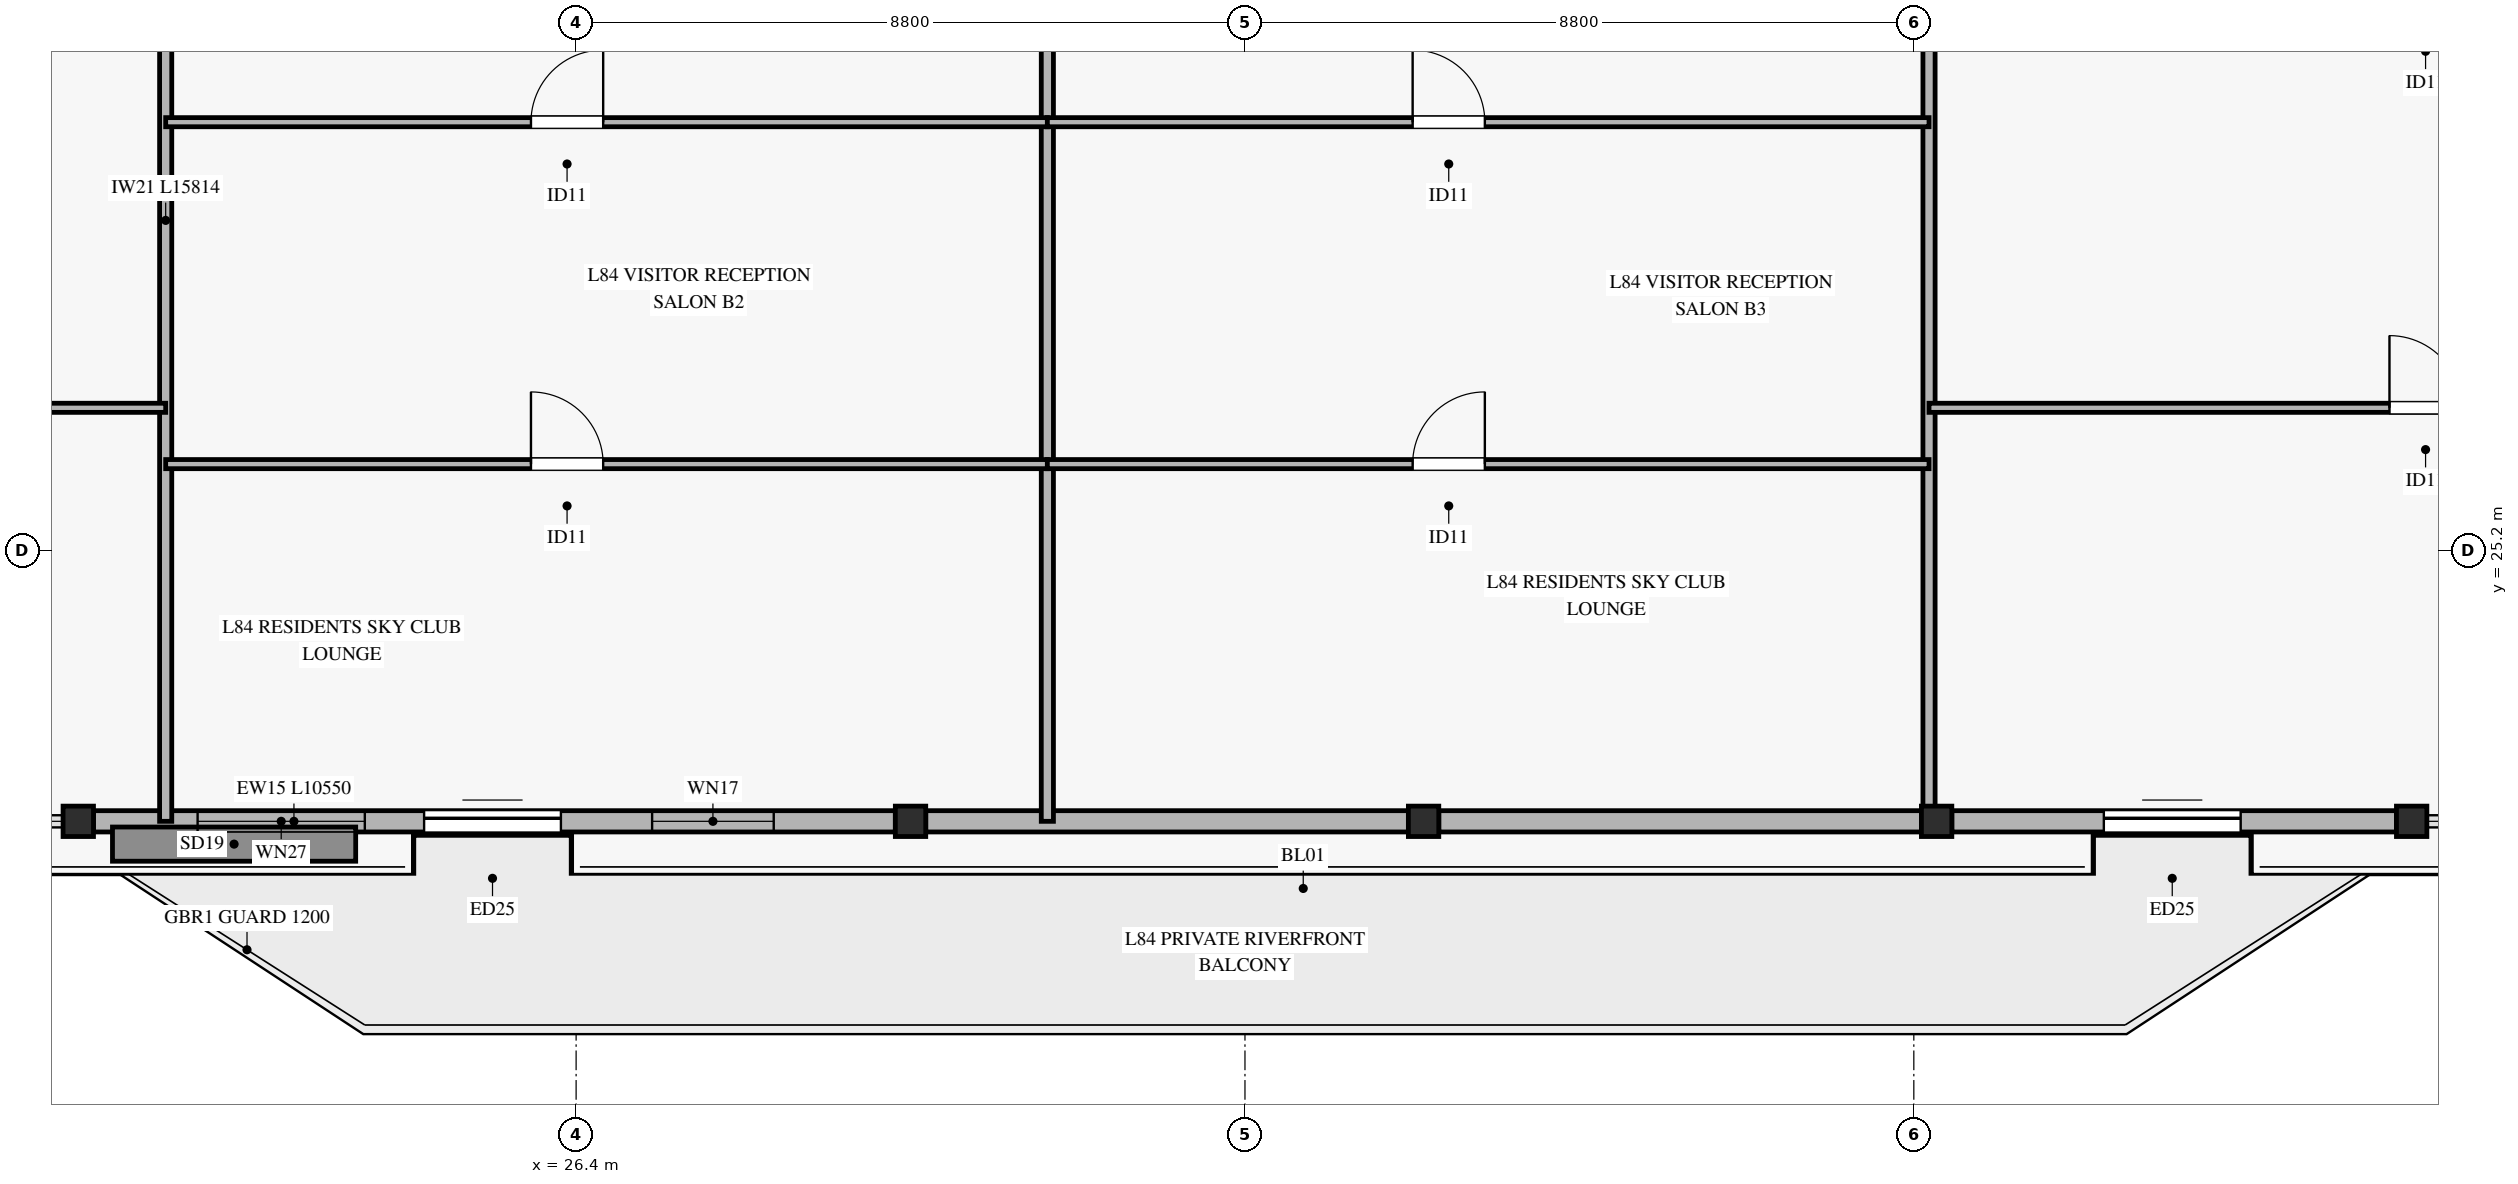
"""IFC4 building model, lengths in metres.
Left out: names, types, materials, properties, quantities, classifications, styles, units other than length and angle.
Written with IfcOpenShell. Run it as: python <this file> out.ifc"""

import sys

from ifc_helpers import new_model, si_unit, direction, frame, frame_2d, origin, origin_2d, place, context, subcontext, project, spatial, rectangle, hollow_rectangle, extrude, source, transform, mapped, element, fill, save


model = new_model("IFC4")
c1 = context("Model", 3, precision=1e-05, world=origin(), true_north=direction((0.0, 1.0)))
c2 = subcontext(c1, "Body", "Model", "MODEL_VIEW")
j1 = project(units=[si_unit("LENGTHUNIT", "METRE"), si_unit("PLANEANGLEUNIT", "RADIAN")], contexts=[c1])
p1 = place(None, origin())
s1 = spatial("IfcSite", under=j1, at=p1, CompositionType="ELEMENT")
p2 = place(p1, origin())
s2 = spatial("IfcBuilding", under=s1, at=p2, CompositionType="ELEMENT")
p3 = place(p2, frame((0.0, 0.0, 324.4)))
s3 = spatial("IfcBuildingStorey", under=s2, at=p3, CompositionType="ELEMENT", Elevation=324.4)
m1 = source(origin(), c2, "Body", "SweptSolid", [
    extrude(hollow_rectangle(XDim=0.4, YDim=0.4, WallThickness=0.02, at=origin_2d()), origin(), (0.0, 0.0, 1.0), 3.12),
])
for number, where, z_axis, x_axis in (
    (1, (19.85, 21.636, 0.0), (0.0, 0.0, 1.0), (1.0, 0.0, 0.0)),
    (2, (30.8, 21.636, 0.0), (0.0, 0.0, 1.0), (1.0, 0.0, 0.0)),
    (3, (37.55, 21.636, 0.0), (0.0, 0.0, 1.0), (1.0, 0.0, 0.0)),
    (4, (44.3, 21.636, 0.0), (0.0, 0.0, 1.0), (1.0, 0.0, 0.0)),
    (5, (50.55, 21.636, 0.0), (0.0, 0.0, 1.0), (1.0, 0.0, 0.0)),
):
    element("IfcColumn", number, at=place(p3, frame(where, z_axis=z_axis, x_axis=x_axis)), inside=s3, PredefinedType="COLUMN", context=c2, shape_type="MappedRepresentation", body=[
        mapped(m1, transform((0.0, 0.0, 0.0), x_axis=(1.0, 0.0, 0.0), y_axis=(0.0, 1.0, 0.0), z_axis=(0.0, 0.0, 1.0), scale=1.0)),
    ])
p4 = place(p3, frame((20.05, 21.636, 0.0), z_axis=(0.0, 0.0, 1.0), x_axis=(1.0, 0.0, 0.0)))
e6 = element("IfcWall", 6, at=p4, inside=s3, PredefinedType="SOLIDWALL", context=c2, shape_type="SweptSolid", body=[
    extrude(rectangle(XDim=10.55, YDim=0.28, at=frame_2d((5.275, 0.0))), origin(), (0.0, 0.0, 1.0), 2.75),
])
p5 = place(p4, frame((4.35, 0.0, 0.0)))
e7 = element("IfcOpeningElement", 7, at=p5, cuts=e6, PredefinedType="OPENING", context=c2, shape_type="SweptSolid", body=[
    extrude(rectangle(XDim=1.8, YDim=2.25, at=frame_2d((0.9, 1.125))), frame((0.0, 0.15, 0.0), z_axis=(0.0, -1.0, 0.0), x_axis=(1.0, 0.0, 0.0)), (0.0, 0.0, 1.0), 0.3),
])
p6 = place(p4, frame((1.37, 0.0, 0.45)))
e8 = element("IfcOpeningElement", 8, at=p6, cuts=e6, PredefinedType="OPENING", context=c2, shape_type="SweptSolid", body=[
    extrude(rectangle(XDim=2.2, YDim=2.1, at=frame_2d((1.1, 1.05))), frame((0.0, 0.15, 0.0), z_axis=(0.0, -1.0, 0.0), x_axis=(1.0, 0.0, 0.0)), (0.0, 0.0, 1.0), 0.3),
])
p7 = place(p4, frame((7.35, 0.0, 0.45)))
e9 = element("IfcOpeningElement", 9, at=p7, cuts=e6, PredefinedType="OPENING", context=c2, shape_type="SweptSolid", body=[
    extrude(rectangle(XDim=1.6, YDim=2.0, at=frame_2d((0.8, 1.0))), frame((0.0, 0.15, 0.0), z_axis=(0.0, -1.0, 0.0), x_axis=(1.0, 0.0, 0.0)), (0.0, 0.0, 1.0), 0.3),
])
for number, where, z_axis, x_axis in (
    (10, (31.0, 21.636, 0.0), (0.0, 0.0, 1.0), (1.0, 0.0, 0.0)),
    (11, (37.75, 21.636, 0.0), (0.0, 0.0, 1.0), (1.0, 0.0, 0.0)),
):
    element("IfcWall", number, at=place(p3, frame(where, z_axis=z_axis, x_axis=x_axis)), inside=s3, PredefinedType="SOLIDWALL", context=c2, shape_type="SweptSolid", body=[
        extrude(rectangle(XDim=6.35, YDim=0.28, at=frame_2d((3.175, 0.0))), origin(), (0.0, 0.0, 1.0), 2.75),
    ])
p8 = place(p3, frame((44.5, 21.636, 0.0), z_axis=(0.0, 0.0, 1.0), x_axis=(1.0, 0.0, 0.0)))
e12 = element("IfcWall", 12, at=p8, inside=s3, PredefinedType="SOLIDWALL", context=c2, shape_type="SweptSolid", body=[
    extrude(rectangle(XDim=5.85, YDim=0.28, at=frame_2d((2.925, 0.0))), origin(), (0.0, 0.0, 1.0), 2.75),
])
p9 = place(p8, frame((2.0, 0.0, 0.0)))
e13 = element("IfcOpeningElement", 13, at=p9, cuts=e12, PredefinedType="OPENING", context=c2, shape_type="SweptSolid", body=[
    extrude(rectangle(XDim=1.8, YDim=2.25, at=frame_2d((0.9, 1.125))), frame((0.0, 0.15, 0.0), z_axis=(0.0, -1.0, 0.0), x_axis=(1.0, 0.0, 0.0)), (0.0, 0.0, 1.0), 0.3),
])
p10 = place(p3, frame((21.0, 21.636, 0.0), z_axis=(0.0, 0.0, 1.0), x_axis=(0.0, 1.0, 0.0)))
e14 = element("IfcWall", 14, at=p10, inside=s3, PredefinedType="PARTITIONING", context=c2, shape_type="SweptSolid", body=[
    extrude(rectangle(XDim=15.814, YDim=0.16, at=frame_2d((7.907, 0.0))), origin(), (0.0, 0.0, 1.0), 2.705),
])
p11 = place(p10, frame((13.934, 0.0, 0.0)))
e15 = element("IfcOpeningElement", 15, at=p11, cuts=e14, PredefinedType="OPENING", context=c2, shape_type="SweptSolid", body=[
    extrude(rectangle(XDim=1.05, YDim=2.15, at=frame_2d((0.525, 1.075))), frame((0.0, 0.09, 0.0), z_axis=(0.0, -1.0, 0.0), x_axis=(1.0, 0.0, 0.0)), (0.0, 0.0, 1.0), 0.18),
])
p12 = place(p3, frame((32.6, 21.636, 0.0), z_axis=(0.0, 0.0, 1.0), x_axis=(0.0, 1.0, 0.0)))
e16 = element("IfcWall", 16, at=p12, inside=s3, PredefinedType="PARTITIONING", context=c2, shape_type="SweptSolid", body=[
    extrude(rectangle(XDim=13.514, YDim=0.16, at=frame_2d((6.757, 0.0))), origin(), (0.0, 0.0, 1.0), 2.705),
])
p13 = place(p3, frame((44.2, 21.636, 0.0), z_axis=(0.0, 0.0, 1.0), x_axis=(0.0, 1.0, 0.0)))
e17 = element("IfcWall", 17, at=p13, inside=s3, PredefinedType="PARTITIONING", context=c2, shape_type="SweptSolid", body=[
    extrude(rectangle(XDim=15.814, YDim=0.16, at=frame_2d((7.907, 0.0))), origin(), (0.0, 0.0, 1.0), 2.405),
])
p14 = place(p13, frame((13.934, 0.0, 0.0)))
e18 = element("IfcOpeningElement", 18, at=p14, cuts=e17, PredefinedType="OPENING", context=c2, shape_type="SweptSolid", body=[
    extrude(rectangle(XDim=1.05, YDim=2.15, at=frame_2d((0.525, 1.075))), frame((0.0, 0.09, 0.0), z_axis=(0.0, -1.0, 0.0), x_axis=(1.0, 0.0, 0.0)), (0.0, 0.0, 1.0), 0.18),
])
p15 = place(p3, frame((11.27, 27.077, 0.0), z_axis=(0.0, 0.0, 1.0), x_axis=(1.0, 0.0, 0.0)))
e19 = element("IfcWall", 19, at=p15, inside=s3, PredefinedType="PARTITIONING", context=c2, shape_type="SweptSolid", body=[
    extrude(rectangle(XDim=9.73, YDim=0.12, at=frame_2d((4.865, 0.0))), origin(), (0.0, 0.0, 1.0), 2.405),
])
p16 = place(p15, frame((4.178, 0.0, 0.0)))
e20 = element("IfcOpeningElement", 20, at=p16, cuts=e19, PredefinedType="OPENING", context=c2, shape_type="SweptSolid", body=[
    extrude(rectangle(XDim=0.95, YDim=2.1, at=frame_2d((0.475, 1.05))), frame((0.0, 0.07, 0.0), z_axis=(0.0, -1.0, 0.0), x_axis=(1.0, 0.0, 0.0)), (0.0, 0.0, 1.0), 0.14),
])
p17 = place(p3, frame((21.0, 26.336, 0.0), z_axis=(0.0, 0.0, 1.0), x_axis=(1.0, 0.0, 0.0)))
e21 = element("IfcWall", 21, at=p17, inside=s3, PredefinedType="PARTITIONING", context=c2, shape_type="SweptSolid", body=[
    extrude(rectangle(XDim=11.6, YDim=0.12, at=frame_2d((5.8, 0.0))), origin(), (0.0, 0.0, 1.0), 2.405),
])
p18 = place(p17, frame((4.806, 0.0, 0.0)))
e22 = element("IfcOpeningElement", 22, at=p18, cuts=e21, PredefinedType="OPENING", context=c2, shape_type="SweptSolid", body=[
    extrude(rectangle(XDim=0.95, YDim=2.1, at=frame_2d((0.475, 1.05))), frame((0.0, 0.07, 0.0), z_axis=(0.0, -1.0, 0.0), x_axis=(1.0, 0.0, 0.0)), (0.0, 0.0, 1.0), 0.14),
])
p19 = place(p3, frame((21.0, 30.835, 0.0), z_axis=(0.0, 0.0, 1.0), x_axis=(1.0, 0.0, 0.0)))
e23 = element("IfcWall", 23, at=p19, inside=s3, PredefinedType="PARTITIONING", context=c2, shape_type="SweptSolid", body=[
    extrude(rectangle(XDim=11.6, YDim=0.12, at=frame_2d((5.8, 0.0))), origin(), (0.0, 0.0, 1.0), 2.405),
])
p20 = place(p19, frame((4.806, 0.0, 0.0)))
e24 = element("IfcOpeningElement", 24, at=p20, cuts=e23, PredefinedType="OPENING", context=c2, shape_type="SweptSolid", body=[
    extrude(rectangle(XDim=0.95, YDim=2.1, at=frame_2d((0.475, 1.05))), frame((0.0, 0.07, 0.0), z_axis=(0.0, -1.0, 0.0), x_axis=(1.0, 0.0, 0.0)), (0.0, 0.0, 1.0), 0.14),
])
p21 = place(p3, frame((32.6, 26.336, 0.0), z_axis=(0.0, 0.0, 1.0), x_axis=(1.0, 0.0, 0.0)))
e25 = element("IfcWall", 25, at=p21, inside=s3, PredefinedType="PARTITIONING", context=c2, shape_type="SweptSolid", body=[
    extrude(rectangle(XDim=11.6, YDim=0.12, at=frame_2d((5.8, 0.0))), origin(), (0.0, 0.0, 1.0), 2.405),
])
p22 = place(p21, frame((4.806, 0.0, 0.0)))
e26 = element("IfcOpeningElement", 26, at=p22, cuts=e25, PredefinedType="OPENING", context=c2, shape_type="SweptSolid", body=[
    extrude(rectangle(XDim=0.95, YDim=2.1, at=frame_2d((0.475, 1.05))), frame((0.0, 0.07, 0.0), z_axis=(0.0, -1.0, 0.0), x_axis=(1.0, 0.0, 0.0)), (0.0, 0.0, 1.0), 0.14),
])
p23 = place(p3, frame((32.6, 30.835, 0.0), z_axis=(0.0, 0.0, 1.0), x_axis=(1.0, 0.0, 0.0)))
e27 = element("IfcWall", 27, at=p23, inside=s3, PredefinedType="PARTITIONING", context=c2, shape_type="SweptSolid", body=[
    extrude(rectangle(XDim=11.6, YDim=0.12, at=frame_2d((5.8, 0.0))), origin(), (0.0, 0.0, 1.0), 2.405),
])
p24 = place(p23, frame((4.806, 0.0, 0.0)))
e28 = element("IfcOpeningElement", 28, at=p24, cuts=e27, PredefinedType="OPENING", context=c2, shape_type="SweptSolid", body=[
    extrude(rectangle(XDim=0.95, YDim=2.1, at=frame_2d((0.475, 1.05))), frame((0.0, 0.07, 0.0), z_axis=(0.0, -1.0, 0.0), x_axis=(1.0, 0.0, 0.0)), (0.0, 0.0, 1.0), 0.14),
])
p25 = place(p3, frame((44.2, 27.077, 0.0), z_axis=(0.0, 0.0, 1.0), x_axis=(1.0, 0.0, 0.0)))
e29 = element("IfcWall", 29, at=p25, inside=s3, PredefinedType="PARTITIONING", context=c2, shape_type="SweptSolid", body=[
    extrude(rectangle(XDim=14.931, YDim=0.12, at=frame_2d((7.466, 0.0))), origin(), (0.0, 0.0, 1.0), 2.405),
])
p26 = place(p25, frame((6.058, 0.0, 0.0)))
e30 = element("IfcOpeningElement", 30, at=p26, cuts=e29, PredefinedType="OPENING", context=c2, shape_type="SweptSolid", body=[
    extrude(rectangle(XDim=0.95, YDim=2.1, at=frame_2d((0.475, 1.05))), frame((0.0, 0.07, 0.0), z_axis=(0.0, -1.0, 0.0), x_axis=(1.0, 0.0, 0.0)), (0.0, 0.0, 1.0), 0.14),
])
m2 = source(origin(), c2, "Body", "SweptSolid", [
    extrude(rectangle(XDim=1.8, YDim=2.25, at=frame_2d((0.9, 1.125))), frame((0.0, 0.025, 0.0), z_axis=(0.0, -1.0, 0.0), x_axis=(1.0, 0.0, 0.0)), (0.0, 0.0, 1.0), 0.05),
])
p27 = place(p5, origin())
e31 = element("IfcDoor", 31, at=p27, inside=s3, OperationType="SLIDING_TO_LEFT", PredefinedType="DOOR", context=c2, shape_type="MappedRepresentation", body=[
    mapped(m2, transform((0.0, 0.0, 0.0), x_axis=(1.0, 0.0, 0.0), y_axis=(0.0, 1.0, 0.0), z_axis=(0.0, 0.0, 1.0), scale=1.0)),
])
fill(e7, e31)
m3 = source(origin(), c2, "Body", "SweptSolid", [
    extrude(rectangle(XDim=2.2, YDim=2.1, at=frame_2d((1.1, 1.05))), frame((0.0, 0.03, 0.0), z_axis=(0.0, -1.0, 0.0), x_axis=(1.0, 0.0, 0.0)), (0.0, 0.0, 1.0), 0.06),
])
p28 = place(p6, origin())
e32 = element("IfcWindow", 32, at=p28, inside=s3, PartitioningType="SINGLE_PANEL", PredefinedType="WINDOW", context=c2, shape_type="MappedRepresentation", body=[
    mapped(m3, transform((0.0, 0.0, 0.0), x_axis=(1.0, 0.0, 0.0), y_axis=(0.0, 1.0, 0.0), z_axis=(0.0, 0.0, 1.0), scale=1.0)),
])
fill(e8, e32)
m4 = source(origin(), c2, "Body", "SweptSolid", [
    extrude(rectangle(XDim=1.6, YDim=2.0, at=frame_2d((0.8, 1.0))), frame((0.0, 0.03, 0.0), z_axis=(0.0, -1.0, 0.0), x_axis=(1.0, 0.0, 0.0)), (0.0, 0.0, 1.0), 0.06),
])
p29 = place(p7, origin())
e33 = element("IfcWindow", 33, at=p29, inside=s3, PartitioningType="SINGLE_PANEL", PredefinedType="WINDOW", context=c2, shape_type="MappedRepresentation", body=[
    mapped(m4, transform((0.0, 0.0, 0.0), x_axis=(1.0, 0.0, 0.0), y_axis=(0.0, 1.0, 0.0), z_axis=(0.0, 0.0, 1.0), scale=1.0)),
])
fill(e9, e33)
p30 = place(p9, origin())
e34 = element("IfcDoor", 34, at=p30, inside=s3, OperationType="SLIDING_TO_LEFT", PredefinedType="DOOR", context=c2, shape_type="MappedRepresentation", body=[
    mapped(m2, transform((0.0, 0.0, 0.0), x_axis=(1.0, 0.0, 0.0), y_axis=(0.0, 1.0, 0.0), z_axis=(0.0, 0.0, 1.0), scale=1.0)),
])
fill(e13, e34)
m5 = source(origin(), c2, "Body", "SweptSolid", [
    extrude(rectangle(XDim=0.95, YDim=2.1, at=frame_2d((0.475, 1.05))), frame((0.0, 0.025, 0.0), z_axis=(0.0, -1.0, 0.0), x_axis=(1.0, 0.0, 0.0)), (0.0, 0.0, 1.0), 0.05),
])
p31 = place(p20, origin())
e35 = element("IfcDoor", 35, at=p31, inside=s3, OperationType="SINGLE_SWING_RIGHT", PredefinedType="DOOR", context=c2, shape_type="MappedRepresentation", body=[
    mapped(m5, transform((0.0, 0.0, 0.0), x_axis=(1.0, 0.0, 0.0), y_axis=(0.0, 1.0, 0.0), z_axis=(0.0, 0.0, 1.0), scale=1.0)),
])
fill(e24, e35)
p32 = place(p18, origin())
e36 = element("IfcDoor", 36, at=p32, inside=s3, OperationType="SINGLE_SWING_LEFT", PredefinedType="DOOR", context=c2, shape_type="MappedRepresentation", body=[
    mapped(m5, transform((0.0, 0.0, 0.0), x_axis=(1.0, 0.0, 0.0), y_axis=(0.0, 1.0, 0.0), z_axis=(0.0, 0.0, 1.0), scale=1.0)),
])
fill(e22, e36)
p33 = place(p24, origin())
e37 = element("IfcDoor", 37, at=p33, inside=s3, OperationType="SINGLE_SWING_LEFT", PredefinedType="DOOR", context=c2, shape_type="MappedRepresentation", body=[
    mapped(m5, transform((0.0, 0.0, 0.0), x_axis=(1.0, 0.0, 0.0), y_axis=(0.0, 1.0, 0.0), z_axis=(0.0, 0.0, 1.0), scale=1.0)),
])
fill(e28, e37)
p34 = place(p22, origin())
e38 = element("IfcDoor", 38, at=p34, inside=s3, OperationType="SINGLE_SWING_RIGHT", PredefinedType="DOOR", context=c2, shape_type="MappedRepresentation", body=[
    mapped(m5, transform((0.0, 0.0, 0.0), x_axis=(1.0, 0.0, 0.0), y_axis=(0.0, 1.0, 0.0), z_axis=(0.0, 0.0, 1.0), scale=1.0)),
])
fill(e26, e38)
p35 = place(p26, origin())
e39 = element("IfcDoor", 39, at=p35, inside=s3, OperationType="SINGLE_SWING_LEFT", PredefinedType="DOOR", context=c2, shape_type="MappedRepresentation", body=[
    mapped(m5, transform((0.0, 0.0, 0.0), x_axis=(1.0, 0.0, 0.0), y_axis=(0.0, 1.0, 0.0), z_axis=(0.0, 0.0, 1.0), scale=1.0)),
])
fill(e30, e39)
save(model, sys.argv[1])
